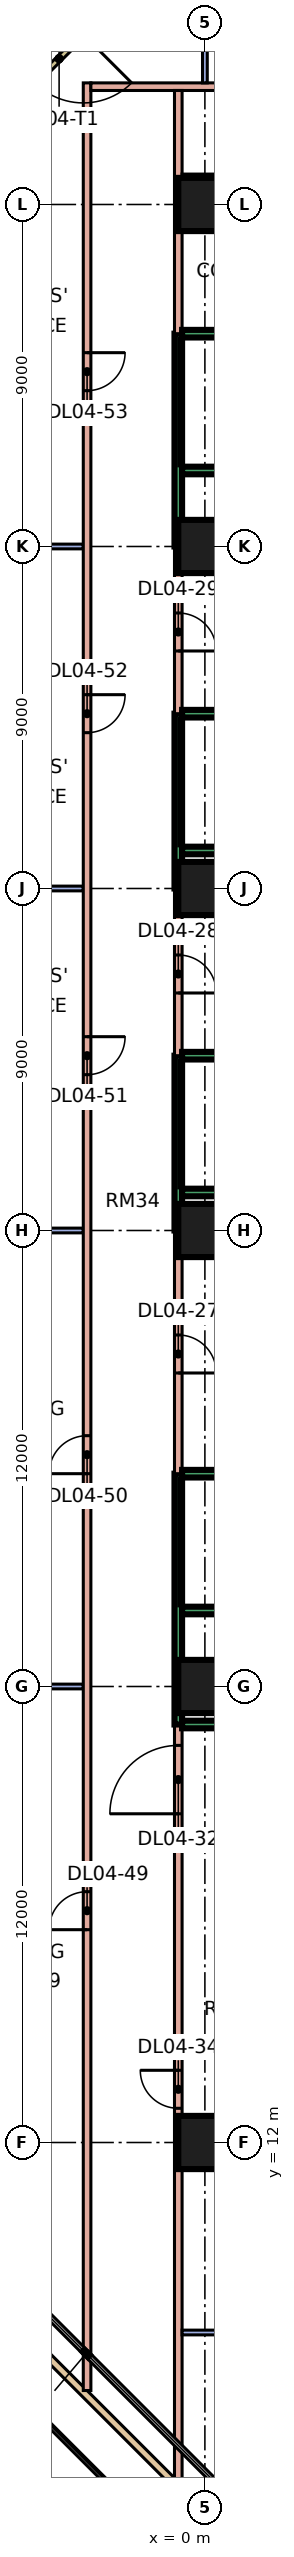
"""IFC4 building model, lengths in metres.
Left out: names, types, materials, properties, quantities, classifications, styles, units other than length and angle.
Written with IfcOpenShell. Run it as: python <this file> out.ifc"""

import sys

from ifc_helpers import new_model, si_unit, direction, frame, frame_2d, origin, origin_2d, place, context, subcontext, project, spatial, rectangle, extrude, element, fill, save


model = new_model("IFC4")
c1 = context("Model", 3, precision=1e-05, world=origin(), true_north=direction((0.0, 1.0)))
c2 = subcontext(c1, "Body", "Model", "MODEL_VIEW")
j1 = project(units=[si_unit("LENGTHUNIT", "METRE"), si_unit("PLANEANGLEUNIT", "RADIAN")], contexts=[c1])
p1 = place(None, origin())
s1 = spatial("IfcSite", under=j1, at=p1, CompositionType="ELEMENT")
p2 = place(p1, origin())
s2 = spatial("IfcBuilding", under=s1, at=p2, CompositionType="ELEMENT")
p3 = place(p2, frame((0.0, 0.0, 21.6)))
s3 = spatial("IfcBuildingStorey", under=s2, at=p3, CompositionType="ELEMENT", Elevation=21.6)
for number, where, z_axis, x_axis in (
    (1, (0.0, 12.0, 0.0), (0.0, 0.0, 1.0), (1.0, 0.0, 0.0)),
    (2, (0.0, 24.0, 0.0), (0.0, 0.0, 1.0), (1.0, 0.0, 0.0)),
    (3, (0.0, 36.0, 0.0), (0.0, 0.0, 1.0), (1.0, 0.0, 0.0)),
    (4, (0.0, 45.0, 0.0), (0.0, 0.0, 1.0), (1.0, 0.0, 0.0)),
    (5, (0.0, 54.0, 0.0), (0.0, 0.0, 1.0), (1.0, 0.0, 0.0)),
    (6, (0.0, 63.0, 0.0), (0.0, 0.0, 1.0), (1.0, 0.0, 0.0)),
):
    element("IfcColumn", number, at=place(p3, frame(where, z_axis=z_axis, x_axis=x_axis)), inside=s3, PredefinedType="COLUMN", context=c2, shape_type="SweptSolid", body=[
        extrude(rectangle(XDim=1.4, YDim=1.4, at=origin_2d()), origin(), (0.0, 0.0, 1.0), 4.8),
    ])
p4 = place(p3, frame((-2.775, 67.897, 0.0), z_axis=(0.0, 0.0, 1.0), x_axis=(-0.707106781187, -0.707106781187, 0.0)))
e7 = element("IfcWall", 7, at=p4, inside=s3, PredefinedType="SOLIDWALL", context=c2, shape_type="SweptSolid", body=[
    extrude(rectangle(XDim=3.0, YDim=0.15, at=frame_2d((1.5, 0.0))), origin(), (0.0, 0.0, 1.0), 4.4),
])
p5 = place(p4, frame((0.6, 0.0, 0.0)))
e8 = element("IfcOpeningElement", 8, at=p5, cuts=e7, PredefinedType="OPENING", context=c2, shape_type="SweptSolid", body=[
    extrude(rectangle(XDim=1.8, YDim=2.4, at=frame_2d((0.9, 1.2))), frame((0.0, 0.085, 0.0), z_axis=(0.0, -1.0, 0.0), x_axis=(1.0, 0.0, 0.0)), (0.0, 0.0, 1.0), 0.17),
])
p6 = place(p3, frame((9.932, -7.7, 0.0), z_axis=(0.0, 0.0, 1.0), x_axis=(-0.707106781187, 0.707106781187, 0.0)))
e9 = element("IfcWall", 9, at=p6, inside=s3, PredefinedType="PARAPET", context=c2, shape_type="SweptSolid", body=[
    extrude(rectangle(XDim=24.935, YDim=0.2, at=frame_2d((12.468, 0.0))), origin(), (0.0, 0.0, 1.0), 0.5),
])
p7 = place(p3, frame((-7.7, 64.068, 0.0), z_axis=(0.0, 0.0, 1.0), x_axis=(0.707106781187, 0.707106781187, 0.0)))
e10 = element("IfcWall", 10, at=p7, inside=s3, PredefinedType="PARAPET", context=c2, shape_type="SweptSolid", body=[
    extrude(rectangle(XDim=9.379, YDim=0.2, at=frame_2d((4.689, 0.0))), origin(), (0.0, 0.0, 1.0), 0.5),
])
for number, where, z_axis, x_axis in (
    (11, (-7.6, 45.0, 0.0), (0.0, 0.0, 1.0), (1.0, 0.0, 0.0)),
    (12, (-7.6, 54.0, 0.0), (0.0, 0.0, 1.0), (1.0, 0.0, 0.0)),
):
    element("IfcWall", number, at=place(p3, frame(where, z_axis=z_axis, x_axis=x_axis)), inside=s3, PredefinedType="PARTITIONING", context=c2, shape_type="SweptSolid", body=[
        extrude(rectangle(XDim=4.4, YDim=0.125, at=frame_2d((2.2, 0.0))), origin(), (0.0, 0.0, 1.0), 4.4),
    ])
for number, where, z_axis, x_axis in (
    (13, (-6.851, 24.0, 0.0), (0.0, 0.0, 1.0), (1.0, 0.0, 0.0)),
    (14, (-6.851, 36.0, 0.0), (0.0, 0.0, 1.0), (1.0, 0.0, 0.0)),
):
    element("IfcWall", number, at=place(p3, frame(where, z_axis=z_axis, x_axis=x_axis)), inside=s3, PredefinedType="PARTITIONING", context=c2, shape_type="SweptSolid", body=[
        extrude(rectangle(XDim=3.651, YDim=0.125, at=frame_2d((1.826, 0.0))), origin(), (0.0, 0.0, 1.0), 4.4),
    ])
p8 = place(p3, frame((-3.1, 5.473, 0.0), z_axis=(0.0, 0.0, 1.0), x_axis=(0.0, 1.0, 0.0)))
e15 = element("IfcWall", 15, at=p8, inside=s3, PredefinedType="PARTITIONING", context=c2, shape_type="SweptSolid", body=[
    extrude(rectangle(XDim=60.727, YDim=0.2, at=frame_2d((30.363, 0.0))), origin(), (0.0, 0.0, 1.0), 4.4),
])
p9 = place(p8, frame((12.127, 0.0, 0.0)))
e16 = element("IfcOpeningElement", 16, at=p9, cuts=e15, PredefinedType="OPENING", context=c2, shape_type="SweptSolid", body=[
    extrude(rectangle(XDim=1.0, YDim=2.1, at=frame_2d((0.5, 1.05))), frame((0.0, 0.11, 0.0), z_axis=(0.0, -1.0, 0.0), x_axis=(1.0, 0.0, 0.0)), (0.0, 0.0, 1.0), 0.22),
])
p10 = place(p8, frame((24.127, 0.0, 0.0)))
e17 = element("IfcOpeningElement", 17, at=p10, cuts=e15, PredefinedType="OPENING", context=c2, shape_type="SweptSolid", body=[
    extrude(rectangle(XDim=1.0, YDim=2.1, at=frame_2d((0.5, 1.05))), frame((0.0, 0.11, 0.0), z_axis=(0.0, -1.0, 0.0), x_axis=(1.0, 0.0, 0.0)), (0.0, 0.0, 1.0), 0.22),
])
p11 = place(p8, frame((34.627, 0.0, 0.0)))
e18 = element("IfcOpeningElement", 18, at=p11, cuts=e15, PredefinedType="OPENING", context=c2, shape_type="SweptSolid", body=[
    extrude(rectangle(XDim=1.0, YDim=2.1, at=frame_2d((0.5, 1.05))), frame((0.0, 0.11, 0.0), z_axis=(0.0, -1.0, 0.0), x_axis=(1.0, 0.0, 0.0)), (0.0, 0.0, 1.0), 0.22),
])
p12 = place(p8, frame((43.627, 0.0, 0.0)))
e19 = element("IfcOpeningElement", 19, at=p12, cuts=e15, PredefinedType="OPENING", context=c2, shape_type="SweptSolid", body=[
    extrude(rectangle(XDim=1.0, YDim=2.1, at=frame_2d((0.5, 1.05))), frame((0.0, 0.11, 0.0), z_axis=(0.0, -1.0, 0.0), x_axis=(1.0, 0.0, 0.0)), (0.0, 0.0, 1.0), 0.22),
])
p13 = place(p8, frame((52.627, 0.0, 0.0)))
e20 = element("IfcOpeningElement", 20, at=p13, cuts=e15, PredefinedType="OPENING", context=c2, shape_type="SweptSolid", body=[
    extrude(rectangle(XDim=1.0, YDim=2.1, at=frame_2d((0.5, 1.05))), frame((0.0, 0.11, 0.0), z_axis=(0.0, -1.0, 0.0), x_axis=(1.0, 0.0, 0.0)), (0.0, 0.0, 1.0), 0.22),
])
p14 = place(p3, frame((-3.0, 66.1, 0.0), z_axis=(0.0, 0.0, 1.0), x_axis=(1.0, 0.0, 0.0)))
e21 = element("IfcWall", 21, at=p14, inside=s3, PredefinedType="PARTITIONING", context=c2, shape_type="SweptSolid", body=[
    extrude(rectangle(XDim=30.0, YDim=0.2, at=frame_2d((15.0, 0.0))), origin(), (0.0, 0.0, 1.0), 4.4),
])
p15 = place(p14, frame((8.6, 0.0, 0.0)))
e22 = element("IfcOpeningElement", 22, at=p15, cuts=e21, PredefinedType="OPENING", context=c2, shape_type="SweptSolid", body=[
    extrude(rectangle(XDim=1.0, YDim=2.1, at=frame_2d((0.5, 1.05))), frame((0.0, 0.11, 0.0), z_axis=(0.0, -1.0, 0.0), x_axis=(1.0, 0.0, 0.0)), (0.0, 0.0, 1.0), 0.22),
])
p16 = place(p14, frame((22.35, 0.0, 0.0)))
e23 = element("IfcOpeningElement", 23, at=p16, cuts=e21, PredefinedType="OPENING", context=c2, shape_type="SweptSolid", body=[
    extrude(rectangle(XDim=1.0, YDim=2.1, at=frame_2d((0.5, 1.05))), frame((0.0, 0.11, 0.0), z_axis=(0.0, -1.0, 0.0), x_axis=(1.0, 0.0, 0.0)), (0.0, 0.0, 1.0), 0.22),
])
p17 = place(p3, frame((-0.7, 3.073, 0.0), z_axis=(0.0, 0.0, 1.0), x_axis=(0.0, 1.0, 0.0)))
e24 = element("IfcWall", 24, at=p17, inside=s3, PredefinedType="PARTITIONING", context=c2, shape_type="SweptSolid", body=[
    extrude(rectangle(XDim=19.927, YDim=0.2, at=frame_2d((9.963, 0.0))), origin(), (0.0, 0.0, 1.0), 4.4),
])
p18 = place(p17, frame((17.577, 0.0, 0.0)))
e25 = element("IfcOpeningElement", 25, at=p18, cuts=e24, PredefinedType="OPENING", context=c2, shape_type="SweptSolid", body=[
    extrude(rectangle(XDim=1.8, YDim=2.1, at=frame_2d((0.9, 1.05))), frame((0.0, 0.11, 0.0), z_axis=(0.0, -1.0, 0.0), x_axis=(1.0, 0.0, 0.0)), (0.0, 0.0, 1.0), 0.22),
])
p19 = place(p17, frame((9.827, 0.0, 0.0)))
e26 = element("IfcOpeningElement", 26, at=p19, cuts=e24, PredefinedType="OPENING", context=c2, shape_type="SweptSolid", body=[
    extrude(rectangle(XDim=1.0, YDim=2.1, at=frame_2d((0.5, 1.05))), frame((0.0, 0.11, 0.0), z_axis=(0.0, -1.0, 0.0), x_axis=(1.0, 0.0, 0.0)), (0.0, 0.0, 1.0), 0.22),
])
p20 = place(p3, frame((-0.7, 23.0, 0.0), z_axis=(0.0, 0.0, 1.0), x_axis=(0.0, 1.0, 0.0)))
e27 = element("IfcWall", 27, at=p20, inside=s3, PredefinedType="SOLIDWALL", context=c2, shape_type="SweptSolid", body=[
    extrude(rectangle(XDim=6.6, YDim=0.2, at=frame_2d((3.3, 0.0))), origin(), (0.0, 0.0, 1.0), 4.4),
])
p21 = place(p3, frame((-0.7, 29.6, 0.0), z_axis=(0.0, 0.0, 1.0), x_axis=(0.0, 1.0, 0.0)))
e28 = element("IfcWall", 28, at=p21, inside=s3, PredefinedType="PARTITIONING", context=c2, shape_type="SweptSolid", body=[
    extrude(rectangle(XDim=6.4, YDim=0.2, at=frame_2d((3.2, 0.0))), origin(), (0.0, 0.0, 1.0), 4.4),
])
p22 = place(p21, frame((2.65, 0.0, 0.0)))
e29 = element("IfcOpeningElement", 29, at=p22, cuts=e28, PredefinedType="OPENING", context=c2, shape_type="SweptSolid", body=[
    extrude(rectangle(XDim=1.0, YDim=2.1, at=frame_2d((0.5, 1.05))), frame((0.0, 0.11, 0.0), z_axis=(0.0, -1.0, 0.0), x_axis=(1.0, 0.0, 0.0)), (0.0, 0.0, 1.0), 0.22),
])
p23 = place(p3, frame((-0.7, 36.0, 0.0), z_axis=(0.0, 0.0, 1.0), x_axis=(0.0, 1.0, 0.0)))
e30 = element("IfcWall", 30, at=p23, inside=s3, PredefinedType="SOLIDWALL", context=c2, shape_type="SweptSolid", body=[
    extrude(rectangle(XDim=4.6, YDim=0.2, at=frame_2d((2.3, 0.0))), origin(), (0.0, 0.0, 1.0), 4.4),
])
p24 = place(p3, frame((-0.7, 40.6, 0.0), z_axis=(0.0, 0.0, 1.0), x_axis=(0.0, 1.0, 0.0)))
e31 = element("IfcWall", 31, at=p24, inside=s3, PredefinedType="PARTITIONING", context=c2, shape_type="SweptSolid", body=[
    extrude(rectangle(XDim=4.4, YDim=0.2, at=frame_2d((2.2, 0.0))), origin(), (0.0, 0.0, 1.0), 4.4),
])
p25 = place(p24, frame((1.65, 0.0, 0.0)))
e32 = element("IfcOpeningElement", 32, at=p25, cuts=e31, PredefinedType="OPENING", context=c2, shape_type="SweptSolid", body=[
    extrude(rectangle(XDim=1.0, YDim=2.1, at=frame_2d((0.5, 1.05))), frame((0.0, 0.11, 0.0), z_axis=(0.0, -1.0, 0.0), x_axis=(1.0, 0.0, 0.0)), (0.0, 0.0, 1.0), 0.22),
])
p26 = place(p3, frame((-0.7, 45.0, 0.0), z_axis=(0.0, 0.0, 1.0), x_axis=(0.0, 1.0, 0.0)))
e33 = element("IfcWall", 33, at=p26, inside=s3, PredefinedType="SOLIDWALL", context=c2, shape_type="SweptSolid", body=[
    extrude(rectangle(XDim=4.6, YDim=0.2, at=frame_2d((2.3, 0.0))), origin(), (0.0, 0.0, 1.0), 4.4),
])
p27 = place(p3, frame((-0.7, 49.6, 0.0), z_axis=(0.0, 0.0, 1.0), x_axis=(0.0, 1.0, 0.0)))
e34 = element("IfcWall", 34, at=p27, inside=s3, PredefinedType="PARTITIONING", context=c2, shape_type="SweptSolid", body=[
    extrude(rectangle(XDim=4.4, YDim=0.2, at=frame_2d((2.2, 0.0))), origin(), (0.0, 0.0, 1.0), 4.4),
])
p28 = place(p27, frame((1.65, 0.0, 0.0)))
e35 = element("IfcOpeningElement", 35, at=p28, cuts=e34, PredefinedType="OPENING", context=c2, shape_type="SweptSolid", body=[
    extrude(rectangle(XDim=1.0, YDim=2.1, at=frame_2d((0.5, 1.05))), frame((0.0, 0.11, 0.0), z_axis=(0.0, -1.0, 0.0), x_axis=(1.0, 0.0, 0.0)), (0.0, 0.0, 1.0), 0.22),
])
p29 = place(p3, frame((-0.7, 54.0, 0.0), z_axis=(0.0, 0.0, 1.0), x_axis=(0.0, 1.0, 0.0)))
e36 = element("IfcWall", 36, at=p29, inside=s3, PredefinedType="SOLIDWALL", context=c2, shape_type="SweptSolid", body=[
    extrude(rectangle(XDim=5.6, YDim=0.2, at=frame_2d((2.8, 0.0))), origin(), (0.0, 0.0, 1.0), 4.4),
])
p30 = place(p3, frame((-0.7, 59.6, 0.0), z_axis=(0.0, 0.0, 1.0), x_axis=(0.0, 1.0, 0.0)))
e37 = element("IfcWall", 37, at=p30, inside=s3, PredefinedType="PARTITIONING", context=c2, shape_type="SweptSolid", body=[
    extrude(rectangle(XDim=6.4, YDim=0.2, at=frame_2d((3.2, 0.0))), origin(), (0.0, 0.0, 1.0), 4.4),
])
p31 = place(p3, frame((-0.6, 7.0, 0.0), z_axis=(0.0, 0.0, 1.0), x_axis=(1.0, 0.0, 0.0)))
e38 = element("IfcWall", 38, at=p31, inside=s3, PredefinedType="PARTITIONING", context=c2, shape_type="SweptSolid", body=[
    extrude(rectangle(XDim=2.638, YDim=0.125, at=frame_2d((1.319, 0.0))), origin(), (0.0, 0.0, 1.0), 4.4),
])
p32 = place(p3, frame((-0.6, 20.0, 0.0), z_axis=(0.0, 0.0, 1.0), x_axis=(1.0, 0.0, 0.0)))
e39 = element("IfcWall", 39, at=p32, inside=s3, PredefinedType="PARTITIONING", context=c2, shape_type="SweptSolid", body=[
    extrude(rectangle(XDim=2.7, YDim=0.2, at=frame_2d((1.35, 0.0))), origin(), (0.0, 0.0, 1.0), 4.4),
])
p33 = place(p3, frame((-0.6, 23.0, 0.0), z_axis=(0.0, 0.0, 1.0), x_axis=(1.0, 0.0, 0.0)))
e40 = element("IfcWall", 40, at=p33, inside=s3, PredefinedType="SOLIDWALL", context=c2, shape_type="SweptSolid", body=[
    extrude(rectangle(XDim=13.3, YDim=0.2, at=frame_2d((6.65, 0.0))), origin(), (0.0, 0.0, 1.0), 4.4),
])
p34 = place(p33, frame((10.6, 0.0, 0.0)))
e41 = element("IfcOpeningElement", 41, at=p34, cuts=e40, PredefinedType="OPENING", context=c2, shape_type="SweptSolid", body=[
    extrude(rectangle(XDim=1.2, YDim=2.1, at=frame_2d((0.6, 1.05))), frame((0.0, 0.11, 0.0), z_axis=(0.0, -1.0, 0.0), x_axis=(1.0, 0.0, 0.0)), (0.0, 0.0, 1.0), 0.22),
])
for number, where, z_axis, x_axis in (
    (42, (-0.6, 29.6, 0.0), (0.0, 0.0, 1.0), (1.0, 0.0, 0.0)),
    (43, (-0.6, 36.0, 0.0), (0.0, 0.0, 1.0), (1.0, 0.0, 0.0)),
    (44, (-0.6, 40.6, 0.0), (0.0, 0.0, 1.0), (1.0, 0.0, 0.0)),
    (45, (-0.6, 45.0, 0.0), (0.0, 0.0, 1.0), (1.0, 0.0, 0.0)),
    (46, (-0.6, 49.6, 0.0), (0.0, 0.0, 1.0), (1.0, 0.0, 0.0)),
    (47, (-0.6, 54.0, 0.0), (0.0, 0.0, 1.0), (1.0, 0.0, 0.0)),
    (48, (-0.6, 59.6, 0.0), (0.0, 0.0, 1.0), (1.0, 0.0, 0.0)),
):
    element("IfcWall", number, at=place(p3, frame(where, z_axis=z_axis, x_axis=x_axis)), inside=s3, PredefinedType="SOLIDWALL", context=c2, shape_type="SweptSolid", body=[
        extrude(rectangle(XDim=13.1, YDim=0.2, at=frame_2d((6.55, 0.0))), origin(), (0.0, 0.0, 1.0), 4.4),
    ])
p35 = place(p3, frame((-0.6, 63.7, 0.0), z_axis=(0.0, 0.0, 1.0), x_axis=(1.0, 0.0, 0.0)))
e49 = element("IfcWall", 49, at=p35, inside=s3, PredefinedType="PARTITIONING", context=c2, shape_type="SweptSolid", body=[
    extrude(rectangle(XDim=13.3, YDim=0.2, at=frame_2d((6.65, 0.0))), origin(), (0.0, 0.0, 1.0), 4.4),
])
p36 = place(p35, frame((6.05, 0.0, 0.0)))
e50 = element("IfcOpeningElement", 50, at=p36, cuts=e49, PredefinedType="OPENING", context=c2, shape_type="SweptSolid", body=[
    extrude(rectangle(XDim=1.0, YDim=2.1, at=frame_2d((0.5, 1.05))), frame((0.0, 0.11, 0.0), z_axis=(0.0, -1.0, 0.0), x_axis=(1.0, 0.0, 0.0)), (0.0, 0.0, 1.0), 0.22),
])
p37 = place(p3, frame((0.0, 66.2, 0.0), z_axis=(0.0, 0.0, 1.0), x_axis=(0.0, 1.0, 0.0)))
e51 = element("IfcWall", 51, at=p37, inside=s3, PredefinedType="PARTITIONING", context=c2, shape_type="SweptSolid", body=[
    extrude(rectangle(XDim=4.4, YDim=0.125, at=frame_2d((2.2, 0.0))), origin(), (0.0, 0.0, 1.0), 4.4),
])
for number, where, z_axis, x_axis in (
    (52, (-0.6, 56.0, 0.0), (0.0, 0.0, 1.0), (1.0, 0.0, 0.0)),
    (53, (-0.6, 46.0, 0.0), (0.0, 0.0, 1.0), (1.0, 0.0, 0.0)),
    (54, (-0.6, 26.0, 0.0), (0.0, 0.0, 1.0), (1.0, 0.0, 0.0)),
    (55, (-0.6, 37.0, 0.0), (0.0, 0.0, 1.0), (1.0, 0.0, 0.0)),
):
    element("IfcWall", number, at=place(p3, frame(where, z_axis=z_axis, x_axis=x_axis)), inside=s3, PredefinedType="SOLIDWALL", context=c2, shape_type="SweptSolid", body=[
        extrude(rectangle(XDim=7.945, YDim=0.2, at=frame_2d((3.973, 0.0))), origin(), (0.0, 0.0, 1.0), 4.4),
    ])
p38 = place(p5, origin())
e56 = element("IfcDoor", 56, at=p38, inside=s3, OperationType="DOUBLE_DOOR_SINGLE_SWING", PredefinedType="DOOR", context=c2, shape_type="SweptSolid", body=[
    extrude(rectangle(XDim=1.8, YDim=2.4, at=frame_2d((0.9, 1.2))), frame((0.0, 0.025, 0.0), z_axis=(0.0, -1.0, 0.0), x_axis=(1.0, 0.0, 0.0)), (0.0, 0.0, 1.0), 0.05),
])
fill(e8, e56)
p39 = place(p22, frame((1.0, 0.0, 0.0), z_axis=(0.0, 0.0, 1.0), x_axis=(-1.0, 0.0, 0.0)))
e57 = element("IfcDoor", 57, at=p39, inside=s3, OperationType="SINGLE_SWING_LEFT", PredefinedType="DOOR", context=c2, shape_type="SweptSolid", body=[
    extrude(rectangle(XDim=1.0, YDim=2.1, at=frame_2d((0.5, 1.05))), frame((0.0, 0.025, 0.0), z_axis=(0.0, -1.0, 0.0), x_axis=(1.0, 0.0, 0.0)), (0.0, 0.0, 1.0), 0.05),
])
fill(e29, e57)
p40 = place(p25, frame((1.0, 0.0, 0.0), z_axis=(0.0, 0.0, 1.0), x_axis=(-1.0, 0.0, 0.0)))
e58 = element("IfcDoor", 58, at=p40, inside=s3, OperationType="SINGLE_SWING_LEFT", PredefinedType="DOOR", context=c2, shape_type="SweptSolid", body=[
    extrude(rectangle(XDim=1.0, YDim=2.1, at=frame_2d((0.5, 1.05))), frame((0.0, 0.025, 0.0), z_axis=(0.0, -1.0, 0.0), x_axis=(1.0, 0.0, 0.0)), (0.0, 0.0, 1.0), 0.05),
])
fill(e32, e58)
p41 = place(p28, frame((1.0, 0.0, 0.0), z_axis=(0.0, 0.0, 1.0), x_axis=(-1.0, 0.0, 0.0)))
e59 = element("IfcDoor", 59, at=p41, inside=s3, OperationType="SINGLE_SWING_LEFT", PredefinedType="DOOR", context=c2, shape_type="SweptSolid", body=[
    extrude(rectangle(XDim=1.0, YDim=2.1, at=frame_2d((0.5, 1.05))), frame((0.0, 0.025, 0.0), z_axis=(0.0, -1.0, 0.0), x_axis=(1.0, 0.0, 0.0)), (0.0, 0.0, 1.0), 0.05),
])
fill(e35, e59)
p42 = place(p18, origin())
e60 = element("IfcDoor", 60, at=p42, inside=s3, OperationType="DOUBLE_DOOR_SINGLE_SWING", PredefinedType="DOOR", context=c2, shape_type="SweptSolid", body=[
    extrude(rectangle(XDim=1.8, YDim=2.1, at=frame_2d((0.9, 1.05))), frame((0.0, 0.025, 0.0), z_axis=(0.0, -1.0, 0.0), x_axis=(1.0, 0.0, 0.0)), (0.0, 0.0, 1.0), 0.05),
])
fill(e25, e60)
p43 = place(p19, frame((1.0, 0.0, 0.0), z_axis=(0.0, 0.0, 1.0), x_axis=(-1.0, 0.0, 0.0)))
e61 = element("IfcDoor", 61, at=p43, inside=s3, OperationType="SINGLE_SWING_RIGHT", PredefinedType="DOOR", context=c2, shape_type="SweptSolid", body=[
    extrude(rectangle(XDim=1.0, YDim=2.1, at=frame_2d((0.5, 1.05))), frame((0.0, 0.025, 0.0), z_axis=(0.0, -1.0, 0.0), x_axis=(1.0, 0.0, 0.0)), (0.0, 0.0, 1.0), 0.05),
])
fill(e26, e61)
p44 = place(p9, origin())
e62 = element("IfcDoor", 62, at=p44, inside=s3, OperationType="SINGLE_SWING_LEFT", PredefinedType="DOOR", context=c2, shape_type="SweptSolid", body=[
    extrude(rectangle(XDim=1.0, YDim=2.1, at=frame_2d((0.5, 1.05))), frame((0.0, 0.025, 0.0), z_axis=(0.0, -1.0, 0.0), x_axis=(1.0, 0.0, 0.0)), (0.0, 0.0, 1.0), 0.05),
])
fill(e16, e62)
p45 = place(p10, origin())
e63 = element("IfcDoor", 63, at=p45, inside=s3, OperationType="SINGLE_SWING_LEFT", PredefinedType="DOOR", context=c2, shape_type="SweptSolid", body=[
    extrude(rectangle(XDim=1.0, YDim=2.1, at=frame_2d((0.5, 1.05))), frame((0.0, 0.025, 0.0), z_axis=(0.0, -1.0, 0.0), x_axis=(1.0, 0.0, 0.0)), (0.0, 0.0, 1.0), 0.05),
])
fill(e17, e63)
p46 = place(p11, origin())
e64 = element("IfcDoor", 64, at=p46, inside=s3, OperationType="SINGLE_SWING_RIGHT", PredefinedType="DOOR", context=c2, shape_type="SweptSolid", body=[
    extrude(rectangle(XDim=1.0, YDim=2.1, at=frame_2d((0.5, 1.05))), frame((0.0, 0.025, 0.0), z_axis=(0.0, -1.0, 0.0), x_axis=(1.0, 0.0, 0.0)), (0.0, 0.0, 1.0), 0.05),
])
fill(e18, e64)
p47 = place(p12, origin())
e65 = element("IfcDoor", 65, at=p47, inside=s3, OperationType="SINGLE_SWING_RIGHT", PredefinedType="DOOR", context=c2, shape_type="SweptSolid", body=[
    extrude(rectangle(XDim=1.0, YDim=2.1, at=frame_2d((0.5, 1.05))), frame((0.0, 0.025, 0.0), z_axis=(0.0, -1.0, 0.0), x_axis=(1.0, 0.0, 0.0)), (0.0, 0.0, 1.0), 0.05),
])
fill(e19, e65)
p48 = place(p13, origin())
e66 = element("IfcDoor", 66, at=p48, inside=s3, OperationType="SINGLE_SWING_RIGHT", PredefinedType="DOOR", context=c2, shape_type="SweptSolid", body=[
    extrude(rectangle(XDim=1.0, YDim=2.1, at=frame_2d((0.5, 1.05))), frame((0.0, 0.025, 0.0), z_axis=(0.0, -1.0, 0.0), x_axis=(1.0, 0.0, 0.0)), (0.0, 0.0, 1.0), 0.05),
])
fill(e20, e66)
save(model, sys.argv[1])
